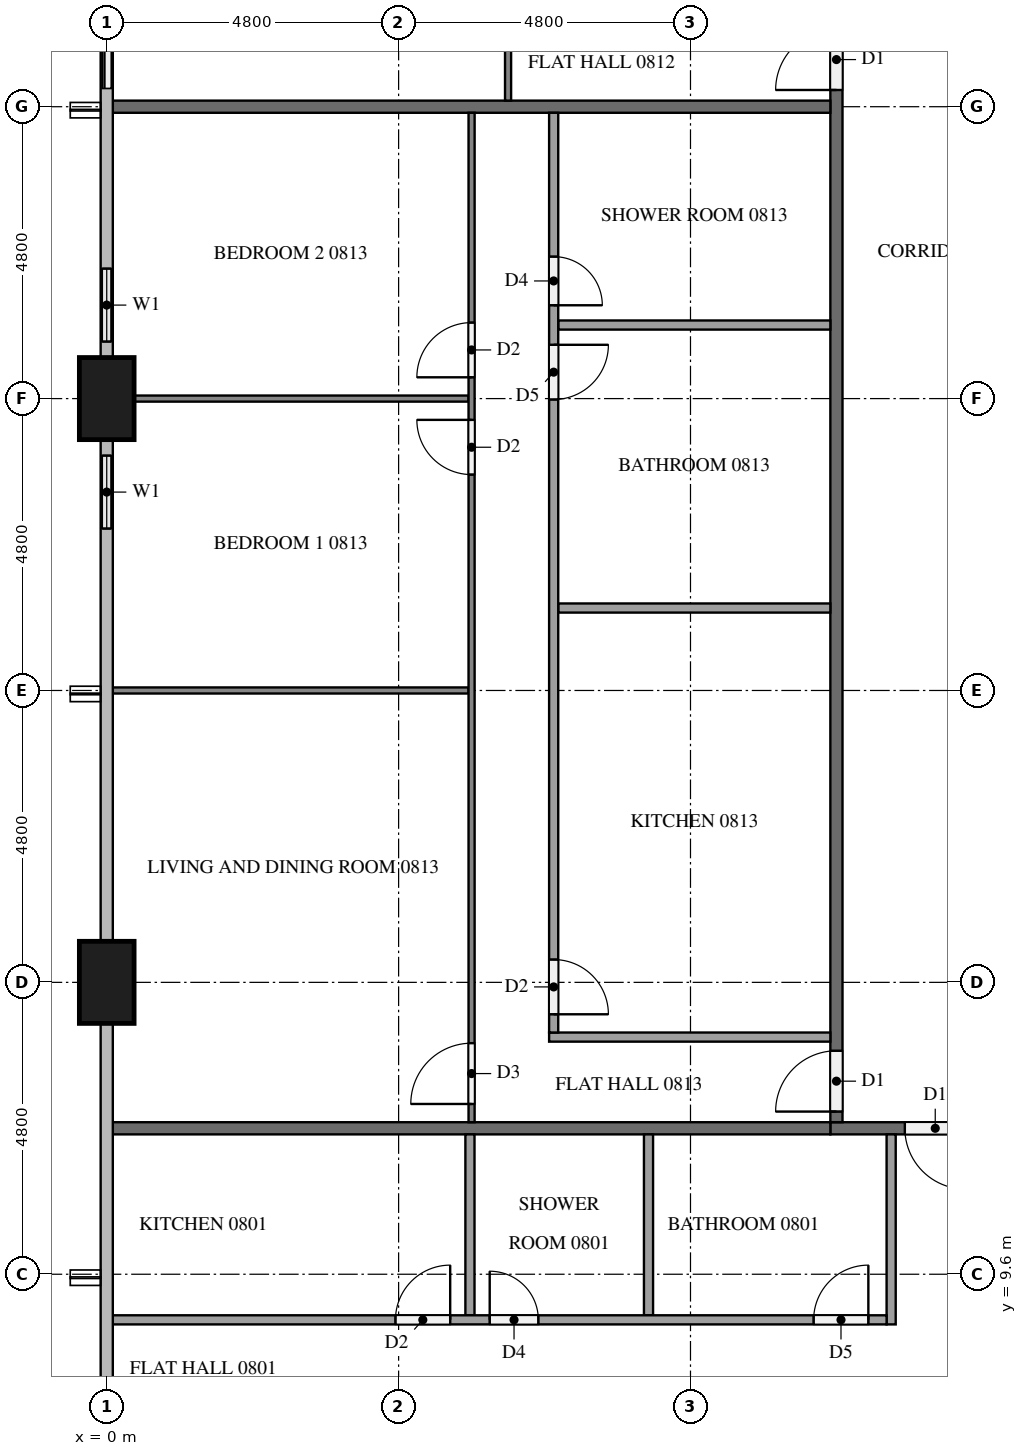
"""IFC4 building model, lengths in metres.
Left out: names, types, materials, properties, quantities, classifications, styles, units other than length and angle.
Written with IfcOpenShell. Run it as: python <this file> out.ifc"""

import sys

from ifc_helpers import new_model, si_unit, direction, frame, frame_2d, origin, origin_2d, place, context, subcontext, project, spatial, rectangle, extrude, element, fill, save


model = new_model("IFC4")
c1 = context("Model", 3, precision=1e-05, world=origin(), true_north=direction((0.0, 1.0)))
c2 = subcontext(c1, "Body", "Model", "MODEL_VIEW")
j1 = project(units=[si_unit("LENGTHUNIT", "METRE"), si_unit("PLANEANGLEUNIT", "RADIAN")], contexts=[c1])
p1 = place(None, origin())
s1 = spatial("IfcSite", under=j1, at=p1, CompositionType="ELEMENT")
p2 = place(p1, origin())
s2 = spatial("IfcBuilding", under=s1, at=p2, CompositionType="ELEMENT")
p3 = place(p2, frame((0.0, 0.0, 36.4)))
s3 = spatial("IfcBuildingStorey", under=s2, at=p3, CompositionType="ELEMENT", Elevation=36.4)
for number, where, z_axis, x_axis in (
    (1, (0.0, 24.0, 0.0), (0.0, 0.0, 1.0), (0.0, 1.0, 0.0)),
    (2, (0.0, 14.4, 0.0), (0.0, 0.0, 1.0), (0.0, 1.0, 0.0)),
):
    element("IfcColumn", number, at=place(p3, frame(where, z_axis=z_axis, x_axis=x_axis)), inside=s3, PredefinedType="COLUMN", context=c2, shape_type="SweptSolid", body=[
        extrude(rectangle(XDim=1.35, YDim=0.9, at=origin_2d()), origin(), (0.0, 0.0, 1.0), 3.2),
    ])
p4 = place(p3, frame((0.0, 31.2, 0.0), z_axis=(0.0, 0.0, 1.0), x_axis=(0.0, -1.0, 0.0)))
e3 = element("IfcWall", 3, at=p4, inside=s3, PredefinedType="SOLIDWALL", context=c2, shape_type="SweptSolid", body=[
    extrude(rectangle(XDim=2.4, YDim=0.15, at=frame_2d((1.2, 0.0))), origin(), (0.0, 0.0, 1.0), 3.2),
])
p5 = place(p4, frame((0.3, 0.0, 0.0)))
e4 = element("IfcOpeningElement", 4, at=p5, cuts=e3, PredefinedType="OPENING", context=c2, shape_type="SweptSolid", body=[
    extrude(rectangle(XDim=1.8, YDim=2.4, at=frame_2d((0.9, 1.2))), frame((0.0, 0.085, 0.0), z_axis=(0.0, -1.0, 0.0), x_axis=(1.0, 0.0, 0.0)), (0.0, 0.0, 1.0), 0.17),
])
p6 = place(p3, frame((0.0, 26.4, 0.0), z_axis=(0.0, 0.0, 1.0), x_axis=(0.0, -1.0, 0.0)))
e5 = element("IfcWall", 5, at=p6, inside=s3, PredefinedType="SOLIDWALL", context=c2, shape_type="SweptSolid", body=[
    extrude(rectangle(XDim=1.725, YDim=0.15, at=frame_2d((0.862, 0.0))), origin(), (0.0, 0.0, 1.0), 3.2),
])
p7 = place(p6, frame((0.262, 0.0, 0.9)))
e6 = element("IfcOpeningElement", 6, at=p7, cuts=e5, PredefinedType="OPENING", context=c2, shape_type="SweptSolid", body=[
    extrude(rectangle(XDim=1.2, YDim=1.4, at=frame_2d((0.6, 0.7))), frame((0.0, 0.085, 0.0), z_axis=(0.0, -1.0, 0.0), x_axis=(1.0, 0.0, 0.0)), (0.0, 0.0, 1.0), 0.17),
])
p8 = place(p3, frame((0.0, 23.325, 0.0), z_axis=(0.0, 0.0, 1.0), x_axis=(0.0, -1.0, 0.0)))
e7 = element("IfcWall", 7, at=p8, inside=s3, PredefinedType="SOLIDWALL", context=c2, shape_type="SweptSolid", body=[
    extrude(rectangle(XDim=1.725, YDim=0.15, at=frame_2d((0.862, 0.0))), origin(), (0.0, 0.0, 1.0), 3.2),
])
p9 = place(p8, frame((0.262, 0.0, 0.9)))
e8 = element("IfcOpeningElement", 8, at=p9, cuts=e7, PredefinedType="OPENING", context=c2, shape_type="SweptSolid", body=[
    extrude(rectangle(XDim=1.2, YDim=1.4, at=frame_2d((0.6, 0.7))), frame((0.0, 0.085, 0.0), z_axis=(0.0, -1.0, 0.0), x_axis=(1.0, 0.0, 0.0)), (0.0, 0.0, 1.0), 0.17),
])
p10 = place(p3, frame((50.5, 12.0, 0.0), z_axis=(0.0, 0.0, 1.0), x_axis=(-1.0, 0.0, 0.0)))
e9 = element("IfcWall", 9, at=p10, inside=s3, PredefinedType="PARTITIONING", context=c2, shape_type="SweptSolid", body=[
    extrude(rectangle(XDim=38.6, YDim=0.2, at=frame_2d((19.3, 0.0))), origin(), (0.0, 0.0, 1.0), 3.2),
])
p11 = place(p10, frame((36.375, 0.0, 0.0)))
e10 = element("IfcOpeningElement", 10, at=p11, cuts=e9, PredefinedType="OPENING", context=c2, shape_type="SweptSolid", body=[
    extrude(rectangle(XDim=1.0, YDim=2.1, at=frame_2d((0.5, 1.05))), frame((0.0, 0.11, 0.0), z_axis=(0.0, -1.0, 0.0), x_axis=(1.0, 0.0, 0.0)), (0.0, 0.0, 1.0), 0.22),
])
p12 = place(p10, frame((34.825, 0.0, 0.0)))
e11 = element("IfcOpeningElement", 11, at=p12, cuts=e9, PredefinedType="OPENING", context=c2, shape_type="SweptSolid", body=[
    extrude(rectangle(XDim=1.0, YDim=2.1, at=frame_2d((0.5, 1.05))), frame((0.0, 0.11, 0.0), z_axis=(0.0, -1.0, 0.0), x_axis=(1.0, 0.0, 0.0)), (0.0, 0.0, 1.0), 0.22),
])
p13 = place(p10, frame((22.825, 0.0, 0.0)))
e12 = element("IfcOpeningElement", 12, at=p13, cuts=e9, PredefinedType="OPENING", context=c2, shape_type="SweptSolid", body=[
    extrude(rectangle(XDim=1.0, YDim=2.1, at=frame_2d((0.5, 1.05))), frame((0.0, 0.11, 0.0), z_axis=(0.0, -1.0, 0.0), x_axis=(1.0, 0.0, 0.0)), (0.0, 0.0, 1.0), 0.22),
])
p14 = place(p10, frame((8.425, 0.0, 0.0)))
e13 = element("IfcOpeningElement", 13, at=p14, cuts=e9, PredefinedType="OPENING", context=c2, shape_type="SweptSolid", body=[
    extrude(rectangle(XDim=1.0, YDim=2.1, at=frame_2d((0.5, 1.05))), frame((0.0, 0.11, 0.0), z_axis=(0.0, -1.0, 0.0), x_axis=(1.0, 0.0, 0.0)), (0.0, 0.0, 1.0), 0.22),
])
p15 = place(p10, frame((1.225, 0.0, 0.0)))
e14 = element("IfcOpeningElement", 14, at=p15, cuts=e9, PredefinedType="OPENING", context=c2, shape_type="SweptSolid", body=[
    extrude(rectangle(XDim=1.0, YDim=2.1, at=frame_2d((0.5, 1.05))), frame((0.0, 0.11, 0.0), z_axis=(0.0, -1.0, 0.0), x_axis=(1.0, 0.0, 0.0)), (0.0, 0.0, 1.0), 0.22),
])
p16 = place(p3, frame((12.0, 12.1, 0.0), z_axis=(0.0, 0.0, 1.0), x_axis=(0.0, 1.0, 0.0)))
e15 = element("IfcWall", 15, at=p16, inside=s3, PredefinedType="PARTITIONING", context=c2, shape_type="SweptSolid", body=[
    extrude(rectangle(XDim=28.6, YDim=0.2, at=frame_2d((14.3, 0.0))), origin(), (0.0, 0.0, 1.0), 3.2),
])
p17 = place(p16, frame((16.975, 0.0, 0.0)))
e16 = element("IfcOpeningElement", 16, at=p17, cuts=e15, PredefinedType="OPENING", context=c2, shape_type="SweptSolid", body=[
    extrude(rectangle(XDim=1.0, YDim=2.1, at=frame_2d((0.5, 1.05))), frame((0.0, 0.11, 0.0), z_axis=(0.0, -1.0, 0.0), x_axis=(1.0, 0.0, 0.0)), (0.0, 0.0, 1.0), 0.22),
])
p18 = place(p16, frame((0.175, 0.0, 0.0)))
e17 = element("IfcOpeningElement", 17, at=p18, cuts=e15, PredefinedType="OPENING", context=c2, shape_type="SweptSolid", body=[
    extrude(rectangle(XDim=1.0, YDim=2.1, at=frame_2d((0.5, 1.05))), frame((0.0, 0.11, 0.0), z_axis=(0.0, -1.0, 0.0), x_axis=(1.0, 0.0, 0.0)), (0.0, 0.0, 1.0), 0.22),
])
for number, where, z_axis, x_axis in (
    (18, (0.1, 12.0, 0.0), (0.0, 0.0, 1.0), (1.0, 0.0, 0.0)),
    (19, (0.1, 28.8, 0.0), (0.0, 0.0, 1.0), (1.0, 0.0, 0.0)),
):
    element("IfcWall", number, at=place(p3, frame(where, z_axis=z_axis, x_axis=x_axis)), inside=s3, PredefinedType="PARTITIONING", context=c2, shape_type="SweptSolid", body=[
        extrude(rectangle(XDim=11.8, YDim=0.2, at=frame_2d((5.9, 0.0))), origin(), (0.0, 0.0, 1.0), 3.2),
    ])
for number, where, z_axis, x_axis in (
    (20, (8.91, 11.9, 0.0), (0.0, 0.0, 1.0), (0.0, -1.0, 0.0)),
    (21, (5.973, 11.9, 0.0), (0.0, 0.0, 1.0), (0.0, -1.0, 0.0)),
):
    element("IfcWall", number, at=place(p3, frame(where, z_axis=z_axis, x_axis=x_axis)), inside=s3, PredefinedType="PARTITIONING", context=c2, shape_type="SweptSolid", body=[
        extrude(rectangle(XDim=2.975, YDim=0.15, at=frame_2d((1.487, 0.0))), origin(), (0.0, 0.0, 1.0), 3.2),
    ])
p19 = place(p3, frame((12.9, 11.9, 0.0), z_axis=(0.0, 0.0, 1.0), x_axis=(0.0, -1.0, 0.0)))
e22 = element("IfcWall", 22, at=p19, inside=s3, PredefinedType="PARTITIONING", context=c2, shape_type="SweptSolid", body=[
    extrude(rectangle(XDim=3.125, YDim=0.15, at=frame_2d((1.562, 0.0))), origin(), (0.0, 0.0, 1.0), 3.2),
])
p20 = place(p3, frame((0.1, 8.85, 0.0), z_axis=(0.0, 0.0, 1.0), x_axis=(1.0, 0.0, 0.0)))
e23 = element("IfcWall", 23, at=p20, inside=s3, PredefinedType="PARTITIONING", context=c2, shape_type="SweptSolid", body=[
    extrude(rectangle(XDim=12.725, YDim=0.15, at=frame_2d((6.362, 0.0))), origin(), (0.0, 0.0, 1.0), 3.2),
])
p21 = place(p20, frame((11.525, 0.0, 0.0)))
e24 = element("IfcOpeningElement", 24, at=p21, cuts=e23, PredefinedType="OPENING", context=c2, shape_type="SweptSolid", body=[
    extrude(rectangle(XDim=0.9, YDim=2.1, at=frame_2d((0.45, 1.05))), frame((0.0, 0.085, 0.0), z_axis=(0.0, -1.0, 0.0), x_axis=(1.0, 0.0, 0.0)), (0.0, 0.0, 1.0), 0.17),
])
p22 = place(p20, frame((6.198, 0.0, 0.0)))
e25 = element("IfcOpeningElement", 25, at=p22, cuts=e23, PredefinedType="OPENING", context=c2, shape_type="SweptSolid", body=[
    extrude(rectangle(XDim=0.8, YDim=2.1, at=frame_2d((0.4, 1.05))), frame((0.0, 0.085, 0.0), z_axis=(0.0, -1.0, 0.0), x_axis=(1.0, 0.0, 0.0)), (0.0, 0.0, 1.0), 0.17),
])
p23 = place(p20, frame((4.648, 0.0, 0.0)))
e26 = element("IfcOpeningElement", 26, at=p23, cuts=e23, PredefinedType="OPENING", context=c2, shape_type="SweptSolid", body=[
    extrude(rectangle(XDim=0.9, YDim=2.1, at=frame_2d((0.45, 1.05))), frame((0.0, 0.085, 0.0), z_axis=(0.0, -1.0, 0.0), x_axis=(1.0, 0.0, 0.0)), (0.0, 0.0, 1.0), 0.17),
])
p24 = place(p3, frame((6.6, 28.9, 0.0), z_axis=(0.0, 0.0, 1.0), x_axis=(0.0, 1.0, 0.0)))
e27 = element("IfcWall", 27, at=p24, inside=s3, PredefinedType="PARTITIONING", context=c2, shape_type="SweptSolid", body=[
    extrude(rectangle(XDim=11.8, YDim=0.1, at=frame_2d((5.9, 0.0))), origin(), (0.0, 0.0, 1.0), 3.2),
])
p25 = place(p24, frame((5.75, 0.0, 0.0)))
e28 = element("IfcOpeningElement", 28, at=p25, cuts=e27, PredefinedType="OPENING", context=c2, shape_type="SweptSolid", body=[
    extrude(rectangle(XDim=1.0, YDim=2.1, at=frame_2d((0.5, 1.05))), frame((0.0, 0.06, 0.0), z_axis=(0.0, -1.0, 0.0), x_axis=(1.0, 0.0, 0.0)), (0.0, 0.0, 1.0), 0.12),
])
p26 = place(p24, frame((7.45, 0.0, 0.0)))
e29 = element("IfcOpeningElement", 29, at=p26, cuts=e27, PredefinedType="OPENING", context=c2, shape_type="SweptSolid", body=[
    extrude(rectangle(XDim=0.9, YDim=2.1, at=frame_2d((0.45, 1.05))), frame((0.0, 0.06, 0.0), z_axis=(0.0, -1.0, 0.0), x_axis=(1.0, 0.0, 0.0)), (0.0, 0.0, 1.0), 0.12),
])
p27 = place(p3, frame((5.95, 19.2, 0.0), z_axis=(0.0, 0.0, 1.0), x_axis=(-1.0, 0.0, 0.0)))
e30 = element("IfcWall", 30, at=p27, inside=s3, PredefinedType="PARTITIONING", context=c2, shape_type="SweptSolid", body=[
    extrude(rectangle(XDim=5.85, YDim=0.1, at=frame_2d((2.925, 0.0))), origin(), (0.0, 0.0, 1.0), 3.2),
])
p28 = place(p3, frame((5.95, 24.0, 0.0), z_axis=(0.0, 0.0, 1.0), x_axis=(-1.0, 0.0, 0.0)))
e31 = element("IfcWall", 31, at=p28, inside=s3, PredefinedType="PARTITIONING", context=c2, shape_type="SweptSolid", body=[
    extrude(rectangle(XDim=5.5, YDim=0.1, at=frame_2d((2.75, 0.0))), origin(), (0.0, 0.0, 1.0), 3.2),
])
p29 = place(p3, frame((6.0, 12.1, 0.0), z_axis=(0.0, 0.0, 1.0), x_axis=(0.0, 1.0, 0.0)))
e32 = element("IfcWall", 32, at=p29, inside=s3, PredefinedType="PARTITIONING", context=c2, shape_type="SweptSolid", body=[
    extrude(rectangle(XDim=16.6, YDim=0.1, at=frame_2d((8.3, 0.0))), origin(), (0.0, 0.0, 1.0), 3.2),
])
p30 = place(p29, frame((0.3, 0.0, 0.0)))
e33 = element("IfcOpeningElement", 33, at=p30, cuts=e32, PredefinedType="OPENING", context=c2, shape_type="SweptSolid", body=[
    extrude(rectangle(XDim=1.0, YDim=2.1, at=frame_2d((0.5, 1.05))), frame((0.0, 0.06, 0.0), z_axis=(0.0, -1.0, 0.0), x_axis=(1.0, 0.0, 0.0)), (0.0, 0.0, 1.0), 0.12),
])
p31 = place(p29, frame((10.65, 0.0, 0.0)))
e34 = element("IfcOpeningElement", 34, at=p31, cuts=e32, PredefinedType="OPENING", context=c2, shape_type="SweptSolid", body=[
    extrude(rectangle(XDim=0.9, YDim=2.1, at=frame_2d((0.45, 1.05))), frame((0.0, 0.06, 0.0), z_axis=(0.0, -1.0, 0.0), x_axis=(1.0, 0.0, 0.0)), (0.0, 0.0, 1.0), 0.12),
])
p32 = place(p29, frame((12.25, 0.0, 0.0)))
e35 = element("IfcOpeningElement", 35, at=p32, cuts=e32, PredefinedType="OPENING", context=c2, shape_type="SweptSolid", body=[
    extrude(rectangle(XDim=0.9, YDim=2.1, at=frame_2d((0.45, 1.05))), frame((0.0, 0.06, 0.0), z_axis=(0.0, -1.0, 0.0), x_axis=(1.0, 0.0, 0.0)), (0.0, 0.0, 1.0), 0.12),
])
for number, where, z_axis, x_axis in (
    (36, (11.9, 20.556, 0.0), (0.0, 0.0, 1.0), (-1.0, 0.0, 0.0)),
    (37, (11.9, 25.21, 0.0), (0.0, 0.0, 1.0), (-1.0, 0.0, 0.0)),
):
    element("IfcWall", number, at=place(p3, frame(where, z_axis=z_axis, x_axis=x_axis)), inside=s3, PredefinedType="PARTITIONING", context=c2, shape_type="SweptSolid", body=[
        extrude(rectangle(XDim=4.475, YDim=0.15, at=frame_2d((2.237, 0.0))), origin(), (0.0, 0.0, 1.0), 3.2),
    ])
p33 = place(p3, frame((11.9, 13.5, 0.0), z_axis=(0.0, 0.0, 1.0), x_axis=(-1.0, 0.0, 0.0)))
e38 = element("IfcWall", 38, at=p33, inside=s3, PredefinedType="PARTITIONING", context=c2, shape_type="SweptSolid", body=[
    extrude(rectangle(XDim=4.625, YDim=0.15, at=frame_2d((2.312, 0.0))), origin(), (0.0, 0.0, 1.0), 3.2),
])
p34 = place(p3, frame((7.35, 28.7, 0.0), z_axis=(0.0, 0.0, 1.0), x_axis=(0.0, -1.0, 0.0)))
e39 = element("IfcWall", 39, at=p34, inside=s3, PredefinedType="PARTITIONING", context=c2, shape_type="SweptSolid", body=[
    extrude(rectangle(XDim=15.125, YDim=0.15, at=frame_2d((7.562, 0.0))), origin(), (0.0, 0.0, 1.0), 3.2),
])
p35 = place(p34, frame((13.925, 0.0, 0.0)))
e40 = element("IfcOpeningElement", 40, at=p35, cuts=e39, PredefinedType="OPENING", context=c2, shape_type="SweptSolid", body=[
    extrude(rectangle(XDim=0.9, YDim=2.1, at=frame_2d((0.45, 1.05))), frame((0.0, 0.085, 0.0), z_axis=(0.0, -1.0, 0.0), x_axis=(1.0, 0.0, 0.0)), (0.0, 0.0, 1.0), 0.17),
])
p36 = place(p34, frame((3.815, 0.0, 0.0)))
e41 = element("IfcOpeningElement", 41, at=p36, cuts=e39, PredefinedType="OPENING", context=c2, shape_type="SweptSolid", body=[
    extrude(rectangle(XDim=0.9, YDim=2.1, at=frame_2d((0.45, 1.05))), frame((0.0, 0.085, 0.0), z_axis=(0.0, -1.0, 0.0), x_axis=(1.0, 0.0, 0.0)), (0.0, 0.0, 1.0), 0.17),
])
p37 = place(p34, frame((2.365, 0.0, 0.0)))
e42 = element("IfcOpeningElement", 42, at=p37, cuts=e39, PredefinedType="OPENING", context=c2, shape_type="SweptSolid", body=[
    extrude(rectangle(XDim=0.8, YDim=2.1, at=frame_2d((0.4, 1.05))), frame((0.0, 0.085, 0.0), z_axis=(0.0, -1.0, 0.0), x_axis=(1.0, 0.0, 0.0)), (0.0, 0.0, 1.0), 0.17),
])
p38 = place(p5, origin())
e43 = element("IfcDoor", 43, at=p38, inside=s3, OperationType="SLIDING_TO_RIGHT", PredefinedType="DOOR", context=c2, shape_type="SweptSolid", body=[
    extrude(rectangle(XDim=1.8, YDim=2.4, at=frame_2d((0.9, 1.2))), frame((0.0, 0.025, 0.0), z_axis=(0.0, -1.0, 0.0), x_axis=(1.0, 0.0, 0.0)), (0.0, 0.0, 1.0), 0.05),
])
fill(e4, e43)
p39 = place(p7, origin())
e44 = element("IfcWindow", 44, at=p39, inside=s3, PartitioningType="SINGLE_PANEL", PredefinedType="WINDOW", context=c2, shape_type="SweptSolid", body=[
    extrude(rectangle(XDim=1.2, YDim=1.4, at=frame_2d((0.6, 0.7))), frame((0.0, 0.03, 0.0), z_axis=(0.0, -1.0, 0.0), x_axis=(1.0, 0.0, 0.0)), (0.0, 0.0, 1.0), 0.06),
])
fill(e6, e44)
p40 = place(p9, origin())
e45 = element("IfcWindow", 45, at=p40, inside=s3, PartitioningType="SINGLE_PANEL", PredefinedType="WINDOW", context=c2, shape_type="SweptSolid", body=[
    extrude(rectangle(XDim=1.2, YDim=1.4, at=frame_2d((0.6, 0.7))), frame((0.0, 0.03, 0.0), z_axis=(0.0, -1.0, 0.0), x_axis=(1.0, 0.0, 0.0)), (0.0, 0.0, 1.0), 0.06),
])
fill(e8, e45)
p41 = place(p11, origin())
e46 = element("IfcDoor", 46, at=p41, inside=s3, OperationType="SINGLE_SWING_LEFT", PredefinedType="DOOR", context=c2, shape_type="SweptSolid", body=[
    extrude(rectangle(XDim=1.0, YDim=2.1, at=frame_2d((0.5, 1.05))), frame((0.0, 0.025, 0.0), z_axis=(0.0, -1.0, 0.0), x_axis=(1.0, 0.0, 0.0)), (0.0, 0.0, 1.0), 0.05),
])
fill(e10, e46)
p42 = place(p17, origin())
e47 = element("IfcDoor", 47, at=p42, inside=s3, OperationType="SINGLE_SWING_LEFT", PredefinedType="DOOR", context=c2, shape_type="SweptSolid", body=[
    extrude(rectangle(XDim=1.0, YDim=2.1, at=frame_2d((0.5, 1.05))), frame((0.0, 0.025, 0.0), z_axis=(0.0, -1.0, 0.0), x_axis=(1.0, 0.0, 0.0)), (0.0, 0.0, 1.0), 0.05),
])
fill(e16, e47)
p43 = place(p18, origin())
e48 = element("IfcDoor", 48, at=p43, inside=s3, OperationType="SINGLE_SWING_LEFT", PredefinedType="DOOR", context=c2, shape_type="SweptSolid", body=[
    extrude(rectangle(XDim=1.0, YDim=2.1, at=frame_2d((0.5, 1.05))), frame((0.0, 0.025, 0.0), z_axis=(0.0, -1.0, 0.0), x_axis=(1.0, 0.0, 0.0)), (0.0, 0.0, 1.0), 0.05),
])
fill(e17, e48)
p44 = place(p21, origin())
e49 = element("IfcDoor", 49, at=p44, inside=s3, OperationType="SINGLE_SWING_RIGHT", PredefinedType="DOOR", context=c2, shape_type="SweptSolid", body=[
    extrude(rectangle(XDim=0.9, YDim=2.1, at=frame_2d((0.45, 1.05))), frame((0.0, 0.025, 0.0), z_axis=(0.0, -1.0, 0.0), x_axis=(1.0, 0.0, 0.0)), (0.0, 0.0, 1.0), 0.05),
])
fill(e24, e49)
p45 = place(p22, origin())
e50 = element("IfcDoor", 50, at=p45, inside=s3, OperationType="SINGLE_SWING_LEFT", PredefinedType="DOOR", context=c2, shape_type="SweptSolid", body=[
    extrude(rectangle(XDim=0.8, YDim=2.1, at=frame_2d((0.4, 1.05))), frame((0.0, 0.025, 0.0), z_axis=(0.0, -1.0, 0.0), x_axis=(1.0, 0.0, 0.0)), (0.0, 0.0, 1.0), 0.05),
])
fill(e25, e50)
p46 = place(p23, origin())
e51 = element("IfcDoor", 51, at=p46, inside=s3, OperationType="SINGLE_SWING_RIGHT", PredefinedType="DOOR", context=c2, shape_type="SweptSolid", body=[
    extrude(rectangle(XDim=0.9, YDim=2.1, at=frame_2d((0.45, 1.05))), frame((0.0, 0.025, 0.0), z_axis=(0.0, -1.0, 0.0), x_axis=(1.0, 0.0, 0.0)), (0.0, 0.0, 1.0), 0.05),
])
fill(e26, e51)
p47 = place(p30, origin())
e52 = element("IfcDoor", 52, at=p47, inside=s3, OperationType="SINGLE_SWING_LEFT", PredefinedType="DOOR", context=c2, shape_type="SweptSolid", body=[
    extrude(rectangle(XDim=1.0, YDim=2.1, at=frame_2d((0.5, 1.05))), frame((0.0, 0.025, 0.0), z_axis=(0.0, -1.0, 0.0), x_axis=(1.0, 0.0, 0.0)), (0.0, 0.0, 1.0), 0.05),
])
fill(e33, e52)
p48 = place(p31, origin())
e53 = element("IfcDoor", 53, at=p48, inside=s3, OperationType="SINGLE_SWING_RIGHT", PredefinedType="DOOR", context=c2, shape_type="SweptSolid", body=[
    extrude(rectangle(XDim=0.9, YDim=2.1, at=frame_2d((0.45, 1.05))), frame((0.0, 0.025, 0.0), z_axis=(0.0, -1.0, 0.0), x_axis=(1.0, 0.0, 0.0)), (0.0, 0.0, 1.0), 0.05),
])
fill(e34, e53)
p49 = place(p32, origin())
e54 = element("IfcDoor", 54, at=p49, inside=s3, OperationType="SINGLE_SWING_LEFT", PredefinedType="DOOR", context=c2, shape_type="SweptSolid", body=[
    extrude(rectangle(XDim=0.9, YDim=2.1, at=frame_2d((0.45, 1.05))), frame((0.0, 0.025, 0.0), z_axis=(0.0, -1.0, 0.0), x_axis=(1.0, 0.0, 0.0)), (0.0, 0.0, 1.0), 0.05),
])
fill(e35, e54)
p50 = place(p35, origin())
e55 = element("IfcDoor", 55, at=p50, inside=s3, OperationType="SINGLE_SWING_RIGHT", PredefinedType="DOOR", context=c2, shape_type="SweptSolid", body=[
    extrude(rectangle(XDim=0.9, YDim=2.1, at=frame_2d((0.45, 1.05))), frame((0.0, 0.025, 0.0), z_axis=(0.0, -1.0, 0.0), x_axis=(1.0, 0.0, 0.0)), (0.0, 0.0, 1.0), 0.05),
])
fill(e40, e55)
p51 = place(p36, origin())
e56 = element("IfcDoor", 56, at=p51, inside=s3, OperationType="SINGLE_SWING_LEFT", PredefinedType="DOOR", context=c2, shape_type="SweptSolid", body=[
    extrude(rectangle(XDim=0.9, YDim=2.1, at=frame_2d((0.45, 1.05))), frame((0.0, 0.025, 0.0), z_axis=(0.0, -1.0, 0.0), x_axis=(1.0, 0.0, 0.0)), (0.0, 0.0, 1.0), 0.05),
])
fill(e41, e56)
p52 = place(p37, origin())
e57 = element("IfcDoor", 57, at=p52, inside=s3, OperationType="SINGLE_SWING_RIGHT", PredefinedType="DOOR", context=c2, shape_type="SweptSolid", body=[
    extrude(rectangle(XDim=0.8, YDim=2.1, at=frame_2d((0.4, 1.05))), frame((0.0, 0.025, 0.0), z_axis=(0.0, -1.0, 0.0), x_axis=(1.0, 0.0, 0.0)), (0.0, 0.0, 1.0), 0.05),
])
fill(e42, e57)
save(model, sys.argv[1])
